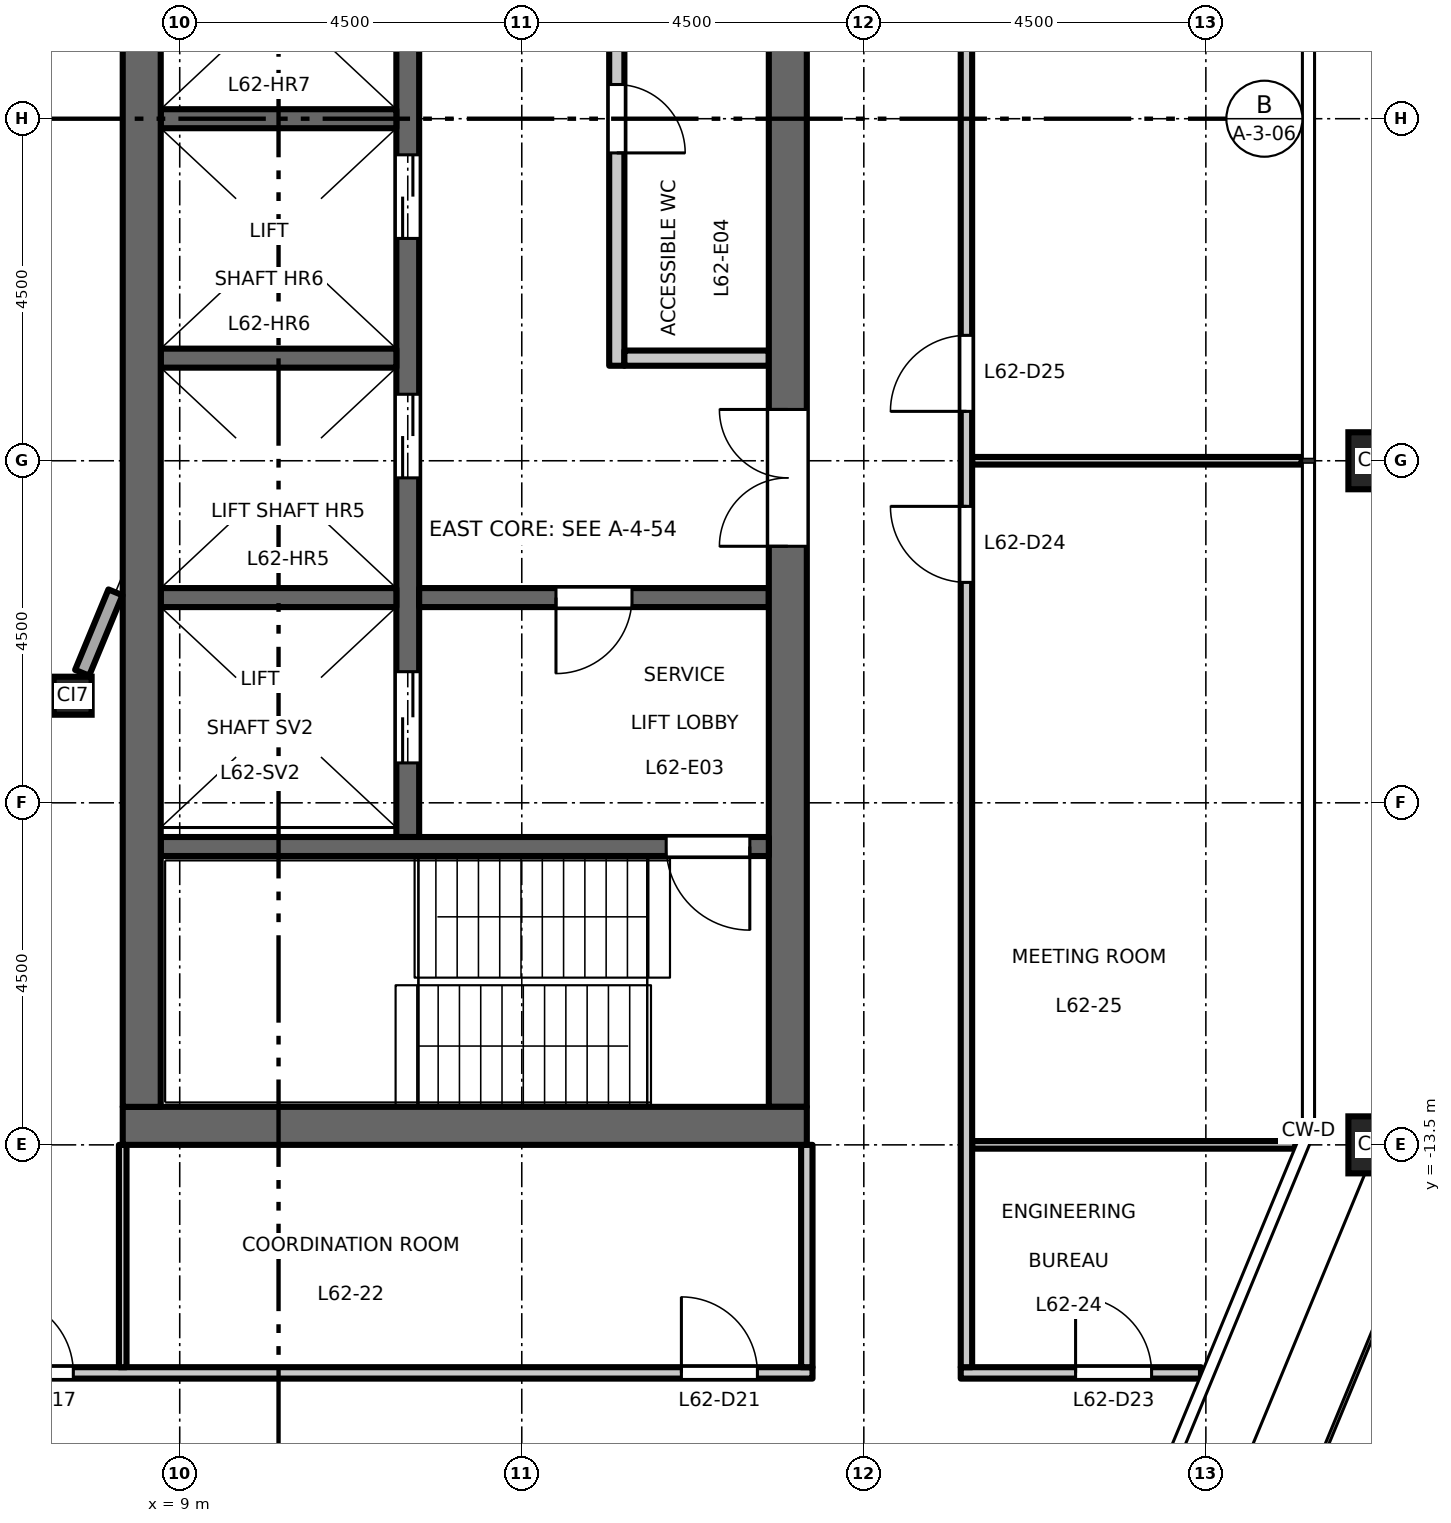
"""IFC4 building model, lengths in metres.
Left out: names, types, materials, properties, quantities, classifications, styles, units other than length and angle.
Written with IfcOpenShell. Run it as: python <this file> out.ifc"""

import sys

from ifc_helpers import new_model, si_unit, direction, frame, frame_2d, origin, origin_2d, place, context, subcontext, project, spatial, rectangle, hollow_rectangle, extrude, element, fill, save


model = new_model("IFC4")
c1 = context("Model", 3, precision=1e-05, world=origin(), true_north=direction((0.0, 1.0)))
c2 = subcontext(c1, "Body", "Model", "MODEL_VIEW")
j1 = project(units=[si_unit("LENGTHUNIT", "METRE"), si_unit("PLANEANGLEUNIT", "RADIAN")], contexts=[c1])
p1 = place(None, origin())
s1 = spatial("IfcSite", under=j1, at=p1, CompositionType="ELEMENT")
p2 = place(p1, origin())
s2 = spatial("IfcBuilding", under=s1, at=p2, CompositionType="ELEMENT")
p3 = place(p2, frame((0.0, 0.0, 289.7)))
s3 = spatial("IfcBuildingStorey", under=s2, at=p3, CompositionType="ELEMENT", Elevation=289.7)
for number, where, z_axis, x_axis in (
    (1, (24.75, -13.5, 0.0), (0.0, 0.0, 1.0), (1.0, 0.0, 0.0)),
    (2, (24.75, -4.5, 0.0), (0.0, 0.0, 1.0), (1.0, 0.0, 0.0)),
):
    element("IfcColumn", number, at=place(p3, frame(where, z_axis=z_axis, x_axis=x_axis)), inside=s3, PredefinedType="COLUMN", context=c2, shape_type="SweptSolid", body=[
        extrude(hollow_rectangle(XDim=0.75, YDim=0.75, WallThickness=0.04, at=origin_2d()), origin(), (0.0, 0.0, 1.0), 4.5),
    ])
p4 = place(p3, frame((7.591, -7.591, 0.0), z_axis=(0.0, 0.0, 1.0), x_axis=(1.0, 0.0, 0.0)))
e3 = element("IfcColumn", 3, at=p4, inside=s3, PredefinedType="COLUMN", context=c2, shape_type="SweptSolid", body=[
    extrude(hollow_rectangle(XDim=0.5, YDim=0.5, WallThickness=0.025, at=origin_2d()), origin(), (0.0, 0.0, 1.0), 4.5),
])
p5 = place(p3, frame((14.75, -3.25, 0.0), z_axis=(0.0, 0.0, 1.0), x_axis=(0.0, 1.0, 0.0)))
e4 = element("IfcWall", 4, at=p5, inside=s3, PredefinedType="PARTITIONING", context=c2, shape_type="SweptSolid", body=[
    extrude(rectangle(XDim=6.5, YDim=0.2, at=frame_2d((3.25, 0.0))), origin(), (0.0, 0.0, 1.0), 4.35),
])
p6 = place(p5, frame((2.8, 0.0, 0.0)))
e5 = element("IfcOpeningElement", 5, at=p6, cuts=e4, PredefinedType="OPENING", context=c2, shape_type="SweptSolid", body=[
    extrude(rectangle(XDim=0.9, YDim=2.1, at=frame_2d((0.45, 1.05))), frame((0.0, 0.11, 0.0), z_axis=(0.0, -1.0, 0.0), x_axis=(1.0, 0.0, 0.0)), (0.0, 0.0, 1.0), 0.22),
])
p7 = place(p3, frame((14.85, -3.15, 0.0), z_axis=(0.0, 0.0, 1.0), x_axis=(1.0, 0.0, 0.0)))
e6 = element("IfcWall", 6, at=p7, inside=s3, PredefinedType="PARTITIONING", context=c2, shape_type="SweptSolid", body=[
    extrude(rectangle(XDim=1.9, YDim=0.2, at=frame_2d((0.95, 0.0))), origin(), (0.0, 0.0, 1.0), 4.35),
])
p8 = place(p3, frame((12.0, -9.45, 0.0), z_axis=(0.0, 0.0, 1.0), x_axis=(0.0, 1.0, 0.0)))
e7 = element("IfcWall", 7, at=p8, inside=s3, PredefinedType="SHEAR", context=c2, shape_type="SweptSolid", body=[
    extrude(rectangle(XDim=18.9, YDim=0.3, at=frame_2d((9.45, 0.0))), origin(), (0.0, 0.0, 1.0), 4.35),
])
p9 = place(p8, frame((4.725, 0.0, 0.0)))
e8 = element("IfcOpeningElement", 8, at=p9, cuts=e7, PredefinedType="OPENING", context=c2, shape_type="SweptSolid", body=[
    extrude(rectangle(XDim=1.1, YDim=2.1, at=frame_2d((0.55, 1.05))), frame((0.0, 0.16, 0.0), z_axis=(0.0, -1.0, 0.0), x_axis=(1.0, 0.0, 0.0)), (0.0, 0.0, 1.0), 0.32),
])
p10 = place(p8, frame((7.875, 0.0, 0.0)))
e9 = element("IfcOpeningElement", 9, at=p10, cuts=e7, PredefinedType="OPENING", context=c2, shape_type="SweptSolid", body=[
    extrude(rectangle(XDim=1.1, YDim=2.1, at=frame_2d((0.55, 1.05))), frame((0.0, 0.16, 0.0), z_axis=(0.0, -1.0, 0.0), x_axis=(1.0, 0.0, 0.0)), (0.0, 0.0, 1.0), 0.32),
])
p11 = place(p8, frame((11.025, 0.0, 0.0)))
e10 = element("IfcOpeningElement", 10, at=p11, cuts=e7, PredefinedType="OPENING", context=c2, shape_type="SweptSolid", body=[
    extrude(rectangle(XDim=1.1, YDim=2.1, at=frame_2d((0.55, 1.05))), frame((0.0, 0.16, 0.0), z_axis=(0.0, -1.0, 0.0), x_axis=(1.0, 0.0, 0.0)), (0.0, 0.0, 1.0), 0.32),
])
p12 = place(p8, frame((14.175, 0.0, 0.0)))
e11 = element("IfcOpeningElement", 11, at=p12, cuts=e7, PredefinedType="OPENING", context=c2, shape_type="SweptSolid", body=[
    extrude(rectangle(XDim=1.1, YDim=2.1, at=frame_2d((0.55, 1.05))), frame((0.0, 0.16, 0.0), z_axis=(0.0, -1.0, 0.0), x_axis=(1.0, 0.0, 0.0)), (0.0, 0.0, 1.0), 0.32),
])
p13 = place(p8, frame((16.725, 0.0, 0.0)))
e12 = element("IfcOpeningElement", 12, at=p13, cuts=e7, PredefinedType="OPENING", context=c2, shape_type="SweptSolid", body=[
    extrude(rectangle(XDim=1.2, YDim=2.1, at=frame_2d((0.6, 1.05))), frame((0.0, 0.16, 0.0), z_axis=(0.0, -1.0, 0.0), x_axis=(1.0, 0.0, 0.0)), (0.0, 0.0, 1.0), 0.32),
])
p14 = place(p8, frame((0.975, 0.0, 0.0)))
e13 = element("IfcOpeningElement", 13, at=p14, cuts=e7, PredefinedType="OPENING", context=c2, shape_type="SweptSolid", body=[
    extrude(rectangle(XDim=1.2, YDim=2.1, at=frame_2d((0.6, 1.05))), frame((0.0, 0.16, 0.0), z_axis=(0.0, -1.0, 0.0), x_axis=(1.0, 0.0, 0.0)), (0.0, 0.0, 1.0), 0.32),
])
p15 = place(p3, frame((12.15, -6.3, 0.0), z_axis=(0.0, 0.0, 1.0), x_axis=(1.0, 0.0, 0.0)))
e14 = element("IfcWall", 14, at=p15, inside=s3, PredefinedType="SHEAR", context=c2, shape_type="SweptSolid", body=[
    extrude(rectangle(XDim=4.6, YDim=0.25, at=frame_2d((2.3, 0.0))), origin(), (0.0, 0.0, 1.0), 4.35),
])
p16 = place(p15, frame((1.8, 0.0, 0.0)))
e15 = element("IfcOpeningElement", 15, at=p16, cuts=e14, PredefinedType="OPENING", context=c2, shape_type="SweptSolid", body=[
    extrude(rectangle(XDim=1.0, YDim=2.1, at=frame_2d((0.5, 1.05))), frame((0.0, 0.135, 0.0), z_axis=(0.0, -1.0, 0.0), x_axis=(1.0, 0.0, 0.0)), (0.0, 0.0, 1.0), 0.27),
])
p17 = place(p3, frame((17.0, -13.0, 0.0), z_axis=(0.0, 0.0, 1.0), x_axis=(0.0, 1.0, 0.0)))
e16 = element("IfcWall", 16, at=p17, inside=s3, PredefinedType="SHEAR", context=c2, shape_type="SweptSolid", body=[
    extrude(rectangle(XDim=26.0, YDim=0.5, at=frame_2d((13.0, 0.0))), origin(), (0.0, 0.0, 1.0), 4.35),
])
p18 = place(p17, frame((16.825, 0.0, 0.0)))
e17 = element("IfcOpeningElement", 17, at=p18, cuts=e16, PredefinedType="OPENING", context=c2, shape_type="SweptSolid", body=[
    extrude(rectangle(XDim=1.8, YDim=2.1, at=frame_2d((0.9, 1.05))), frame((0.0, 0.26, 0.0), z_axis=(0.0, -1.0, 0.0), x_axis=(1.0, 0.0, 0.0)), (0.0, 0.0, 1.0), 0.52),
])
p19 = place(p17, frame((7.375, 0.0, 0.0)))
e18 = element("IfcOpeningElement", 18, at=p19, cuts=e16, PredefinedType="OPENING", context=c2, shape_type="SweptSolid", body=[
    extrude(rectangle(XDim=1.8, YDim=2.1, at=frame_2d((0.9, 1.05))), frame((0.0, 0.26, 0.0), z_axis=(0.0, -1.0, 0.0), x_axis=(1.0, 0.0, 0.0)), (0.0, 0.0, 1.0), 0.52),
])
for number, where, z_axis, x_axis in (
    (19, (8.75, 0.0, 0.0), (0.0, 0.0, 1.0), (1.0, 0.0, 0.0)),
    (20, (8.75, -3.15, 0.0), (0.0, 0.0, 1.0), (1.0, 0.0, 0.0)),
    (21, (8.75, -6.3, 0.0), (0.0, 0.0, 1.0), (1.0, 0.0, 0.0)),
):
    element("IfcWall", number, at=place(p3, frame(where, z_axis=z_axis, x_axis=x_axis)), inside=s3, PredefinedType="SHEAR", context=c2, shape_type="SweptSolid", body=[
        extrude(rectangle(XDim=3.1, YDim=0.25, at=frame_2d((1.55, 0.0))), origin(), (0.0, 0.0, 1.0), 4.35),
    ])
p20 = place(p3, frame((8.75, -9.575, 0.0), z_axis=(0.0, 0.0, 1.0), x_axis=(1.0, 0.0, 0.0)))
e22 = element("IfcWall", 22, at=p20, inside=s3, PredefinedType="SHEAR", context=c2, shape_type="SweptSolid", body=[
    extrude(rectangle(XDim=8.0, YDim=0.25, at=frame_2d((4.0, 0.0))), origin(), (0.0, 0.0, 1.0), 4.35),
])
p21 = place(p20, frame((6.65, 0.0, 0.0)))
e23 = element("IfcOpeningElement", 23, at=p21, cuts=e22, PredefinedType="OPENING", context=c2, shape_type="SweptSolid", body=[
    extrude(rectangle(XDim=1.1, YDim=2.1, at=frame_2d((0.55, 1.05))), frame((0.0, 0.135, 0.0), z_axis=(0.0, -1.0, 0.0), x_axis=(1.0, 0.0, 0.0)), (0.0, 0.0, 1.0), 0.27),
])
p22 = place(p3, frame((8.25, -13.25, 0.0), z_axis=(0.0, 0.0, 1.0), x_axis=(1.0, 0.0, 0.0)))
e24 = element("IfcWall", 24, at=p22, inside=s3, PredefinedType="SHEAR", context=c2, shape_type="SweptSolid", body=[
    extrude(rectangle(XDim=9.0, YDim=0.5, at=frame_2d((4.5, 0.0))), origin(), (0.0, 0.0, 1.0), 4.35),
])
p23 = place(p3, frame((8.5, -13.0, 0.0), z_axis=(0.0, 0.0, 1.0), x_axis=(0.0, 1.0, 0.0)))
e25 = element("IfcWall", 25, at=p23, inside=s3, PredefinedType="SHEAR", context=c2, shape_type="SweptSolid", body=[
    extrude(rectangle(XDim=26.0, YDim=0.5, at=frame_2d((13.0, 0.0))), origin(), (0.0, 0.0, 1.0), 4.35),
])
p24 = place(p3, frame((6.302, -8.125, 0.0), z_axis=(0.0, 0.0, 1.0), x_axis=(0.923919409248, 0.382587147216, 0.0)))
e26 = element("IfcWall", 26, at=p24, inside=s3, PredefinedType="STANDARD", context=c2, shape_type="SweptSolid", body=[
    extrude(rectangle(XDim=1.069, YDim=0.2, at=frame_2d((0.534, 0.0))), origin(), (0.0, 0.0, 1.0), 4.01),
])
p25 = place(p3, frame((7.716, -7.289, 0.0), z_axis=(0.0, 0.0, 1.0), x_axis=(0.382571404949, 0.923925927829, 0.0)))
e27 = element("IfcWall", 27, at=p25, inside=s3, PredefinedType="STANDARD", context=c2, shape_type="SweptSolid", body=[
    extrude(rectangle(XDim=1.146, YDim=0.2, at=frame_2d((0.573, 0.0))), origin(), (0.0, 0.0, 1.0), 4.01),
])
p26 = place(p3, frame((-17.325, -16.5, 0.0), z_axis=(0.0, 0.0, 1.0), x_axis=(1.0, 0.0, 0.0)))
e28 = element("IfcWall", 28, at=p26, inside=s3, PredefinedType="PARTITIONING", context=c2, shape_type="SweptSolid", body=[
    extrude(rectangle(XDim=34.65, YDim=0.15, at=frame_2d((17.325, 0.0))), origin(), (0.0, 0.0, 1.0), 4.35),
])
p27 = place(p26, frame((9.675, 0.0, 0.0)))
e29 = element("IfcOpeningElement", 29, at=p27, cuts=e28, PredefinedType="OPENING", context=c2, shape_type="SweptSolid", body=[
    extrude(rectangle(XDim=1.0, YDim=2.1, at=frame_2d((0.5, 1.05))), frame((0.0, 0.085, 0.0), z_axis=(0.0, -1.0, 0.0), x_axis=(1.0, 0.0, 0.0)), (0.0, 0.0, 1.0), 0.17),
])
p28 = place(p26, frame((23.925, 0.0, 0.0)))
e30 = element("IfcOpeningElement", 30, at=p28, cuts=e28, PredefinedType="OPENING", context=c2, shape_type="SweptSolid", body=[
    extrude(rectangle(XDim=1.0, YDim=2.1, at=frame_2d((0.5, 1.05))), frame((0.0, 0.085, 0.0), z_axis=(0.0, -1.0, 0.0), x_axis=(1.0, 0.0, 0.0)), (0.0, 0.0, 1.0), 0.17),
])
p29 = place(p26, frame((0.675, 0.0, 0.0)))
e31 = element("IfcOpeningElement", 31, at=p29, cuts=e28, PredefinedType="OPENING", context=c2, shape_type="SweptSolid", body=[
    extrude(rectangle(XDim=1.0, YDim=2.1, at=frame_2d((0.5, 1.05))), frame((0.0, 0.085, 0.0), z_axis=(0.0, -1.0, 0.0), x_axis=(1.0, 0.0, 0.0)), (0.0, 0.0, 1.0), 0.17),
])
p30 = place(p26, frame((32.925, 0.0, 0.0)))
e32 = element("IfcOpeningElement", 32, at=p30, cuts=e28, PredefinedType="OPENING", context=c2, shape_type="SweptSolid", body=[
    extrude(rectangle(XDim=1.0, YDim=2.1, at=frame_2d((0.5, 1.05))), frame((0.0, 0.085, 0.0), z_axis=(0.0, -1.0, 0.0), x_axis=(1.0, 0.0, 0.0)), (0.0, 0.0, 1.0), 0.17),
])
p31 = place(p3, frame((19.275, -16.5, 0.0), z_axis=(0.0, 0.0, 1.0), x_axis=(1.0, 0.0, 0.0)))
e33 = element("IfcWall", 33, at=p31, inside=s3, PredefinedType="PARTITIONING", context=c2, shape_type="SweptSolid", body=[
    extrude(rectangle(XDim=3.161, YDim=0.15, at=frame_2d((1.581, 0.0))), origin(), (0.0, 0.0, 1.0), 4.35),
])
p32 = place(p31, frame((1.511, 0.0, 0.0)))
e34 = element("IfcOpeningElement", 34, at=p32, cuts=e33, PredefinedType="OPENING", context=c2, shape_type="SweptSolid", body=[
    extrude(rectangle(XDim=1.0, YDim=2.1, at=frame_2d((0.5, 1.05))), frame((0.0, 0.085, 0.0), z_axis=(0.0, -1.0, 0.0), x_axis=(1.0, 0.0, 0.0)), (0.0, 0.0, 1.0), 0.17),
])
p33 = place(p3, frame((19.425, -13.5, 0.0), z_axis=(0.0, 0.0, 1.0), x_axis=(1.0, 0.0, 0.0)))
e35 = element("IfcWall", 35, at=p33, inside=s3, PredefinedType="PARTITIONING", context=c2, shape_type="SweptSolid", body=[
    extrude(rectangle(XDim=4.253, YDim=0.1, at=frame_2d((2.126, 0.0))), origin(), (0.0, 0.0, 1.0), 4.35),
])
p34 = place(p3, frame((19.425, -4.5, 0.0), z_axis=(0.0, 0.0, 1.0), x_axis=(1.0, 0.0, 0.0)))
e36 = element("IfcWall", 36, at=p34, inside=s3, PredefinedType="PARTITIONING", context=c2, shape_type="SweptSolid", body=[
    extrude(rectangle(XDim=4.335, YDim=0.1, at=frame_2d((2.167, 0.0))), origin(), (0.0, 0.0, 1.0), 4.35),
])
p35 = place(p3, frame((8.25, -16.425, 0.0), z_axis=(0.0, 0.0, 1.0), x_axis=(0.0, 1.0, 0.0)))
e37 = element("IfcWall", 37, at=p35, inside=s3, PredefinedType="PARTITIONING", context=c2, shape_type="SweptSolid", body=[
    extrude(rectangle(XDim=2.925, YDim=0.1, at=frame_2d((1.462, 0.0))), origin(), (0.0, 0.0, 1.0), 4.35),
])
p36 = place(p3, frame((17.25, -16.425, 0.0), z_axis=(0.0, 0.0, 1.0), x_axis=(0.0, 1.0, 0.0)))
e38 = element("IfcWall", 38, at=p36, inside=s3, PredefinedType="PARTITIONING", context=c2, shape_type="SweptSolid", body=[
    extrude(rectangle(XDim=2.925, YDim=0.15, at=frame_2d((1.462, 0.0))), origin(), (0.0, 0.0, 1.0), 4.35),
])
p37 = place(p3, frame((19.35, -16.425, 0.0), z_axis=(0.0, 0.0, 1.0), x_axis=(0.0, 1.0, 0.0)))
e39 = element("IfcWall", 39, at=p37, inside=s3, PredefinedType="PARTITIONING", context=c2, shape_type="SweptSolid", body=[
    extrude(rectangle(XDim=32.85, YDim=0.15, at=frame_2d((16.425, 0.0))), origin(), (0.0, 0.0, 1.0), 4.35),
])
p38 = place(p37, frame((10.325, 0.0, 0.0)))
e40 = element("IfcOpeningElement", 40, at=p38, cuts=e39, PredefinedType="OPENING", context=c2, shape_type="SweptSolid", body=[
    extrude(rectangle(XDim=1.0, YDim=2.1, at=frame_2d((0.5, 1.05))), frame((0.0, 0.085, 0.0), z_axis=(0.0, -1.0, 0.0), x_axis=(1.0, 0.0, 0.0)), (0.0, 0.0, 1.0), 0.17),
])
p39 = place(p37, frame((12.575, 0.0, 0.0)))
e41 = element("IfcOpeningElement", 41, at=p39, cuts=e39, PredefinedType="OPENING", context=c2, shape_type="SweptSolid", body=[
    extrude(rectangle(XDim=1.0, YDim=2.1, at=frame_2d((0.5, 1.05))), frame((0.0, 0.085, 0.0), z_axis=(0.0, -1.0, 0.0), x_axis=(1.0, 0.0, 0.0)), (0.0, 0.0, 1.0), 0.17),
])
p40 = place(p37, frame((28.325, 0.0, 0.0)))
e42 = element("IfcOpeningElement", 42, at=p40, cuts=e39, PredefinedType="OPENING", context=c2, shape_type="SweptSolid", body=[
    extrude(rectangle(XDim=1.0, YDim=2.1, at=frame_2d((0.5, 1.05))), frame((0.0, 0.085, 0.0), z_axis=(0.0, -1.0, 0.0), x_axis=(1.0, 0.0, 0.0)), (0.0, 0.0, 1.0), 0.17),
])
p41 = place(p16, origin())
e43 = element("IfcDoor", 43, at=p41, inside=s3, OperationType="SINGLE_SWING_LEFT", PredefinedType="DOOR", context=c2, shape_type="SweptSolid", body=[
    extrude(rectangle(XDim=1.0, YDim=2.1, at=frame_2d((0.5, 1.05))), frame((0.0, 0.025, 0.0), z_axis=(0.0, -1.0, 0.0), x_axis=(1.0, 0.0, 0.0)), (0.0, 0.0, 1.0), 0.05),
])
fill(e15, e43)
p42 = place(p21, origin())
e44 = element("IfcDoor", 44, at=p42, inside=s3, OperationType="SINGLE_SWING_RIGHT", PredefinedType="DOOR", context=c2, shape_type="SweptSolid", body=[
    extrude(rectangle(XDim=1.1, YDim=2.1, at=frame_2d((0.55, 1.05))), frame((0.0, 0.025, 0.0), z_axis=(0.0, -1.0, 0.0), x_axis=(1.0, 0.0, 0.0)), (0.0, 0.0, 1.0), 0.05),
])
fill(e23, e44)
p43 = place(p19, origin())
e45 = element("IfcDoor", 45, at=p43, inside=s3, OperationType="DOUBLE_DOOR_DOUBLE_SWING", PredefinedType="DOOR", context=c2, shape_type="SweptSolid", body=[
    extrude(rectangle(XDim=1.8, YDim=2.1, at=frame_2d((0.9, 1.05))), frame((0.0, 0.025, 0.0), z_axis=(0.0, -1.0, 0.0), x_axis=(1.0, 0.0, 0.0)), (0.0, 0.0, 1.0), 0.05),
])
fill(e18, e45)
p44 = place(p9, origin())
e46 = element("IfcDoor", 46, at=p44, inside=s3, OperationType="DOUBLE_DOOR_SLIDING", PredefinedType="DOOR", context=c2, shape_type="SweptSolid", body=[
    extrude(rectangle(XDim=1.1, YDim=2.1, at=frame_2d((0.55, 1.05))), frame((0.0, 0.025, 0.0), z_axis=(0.0, -1.0, 0.0), x_axis=(1.0, 0.0, 0.0)), (0.0, 0.0, 1.0), 0.05),
])
fill(e8, e46)
p45 = place(p10, origin())
e47 = element("IfcDoor", 47, at=p45, inside=s3, OperationType="DOUBLE_DOOR_SLIDING", PredefinedType="DOOR", context=c2, shape_type="SweptSolid", body=[
    extrude(rectangle(XDim=1.1, YDim=2.1, at=frame_2d((0.55, 1.05))), frame((0.0, 0.025, 0.0), z_axis=(0.0, -1.0, 0.0), x_axis=(1.0, 0.0, 0.0)), (0.0, 0.0, 1.0), 0.05),
])
fill(e9, e47)
p46 = place(p14, origin())
e48 = element("IfcDoor", 48, at=p46, inside=s3, OperationType="DOUBLE_DOOR_SLIDING", PredefinedType="DOOR", context=c2, shape_type="SweptSolid", body=[
    extrude(rectangle(XDim=1.2, YDim=2.1, at=frame_2d((0.6, 1.05))), frame((0.0, 0.025, 0.0), z_axis=(0.0, -1.0, 0.0), x_axis=(1.0, 0.0, 0.0)), (0.0, 0.0, 1.0), 0.05),
])
fill(e13, e48)
p47 = place(p6, origin())
e49 = element("IfcDoor", 49, at=p47, inside=s3, OperationType="SINGLE_SWING_LEFT", PredefinedType="DOOR", context=c2, shape_type="SweptSolid", body=[
    extrude(rectangle(XDim=0.9, YDim=2.1, at=frame_2d((0.45, 1.05))), frame((0.0, 0.025, 0.0), z_axis=(0.0, -1.0, 0.0), x_axis=(1.0, 0.0, 0.0)), (0.0, 0.0, 1.0), 0.05),
])
fill(e5, e49)
p48 = place(p28, origin())
e50 = element("IfcDoor", 50, at=p48, inside=s3, OperationType="SINGLE_SWING_LEFT", PredefinedType="DOOR", context=c2, shape_type="SweptSolid", body=[
    extrude(rectangle(XDim=1.0, YDim=2.1, at=frame_2d((0.5, 1.05))), frame((0.0, 0.025, 0.0), z_axis=(0.0, -1.0, 0.0), x_axis=(1.0, 0.0, 0.0)), (0.0, 0.0, 1.0), 0.05),
])
fill(e30, e50)
p49 = place(p30, origin())
e51 = element("IfcDoor", 51, at=p49, inside=s3, OperationType="SINGLE_SWING_LEFT", PredefinedType="DOOR", context=c2, shape_type="SweptSolid", body=[
    extrude(rectangle(XDim=1.0, YDim=2.1, at=frame_2d((0.5, 1.05))), frame((0.0, 0.025, 0.0), z_axis=(0.0, -1.0, 0.0), x_axis=(1.0, 0.0, 0.0)), (0.0, 0.0, 1.0), 0.05),
])
fill(e32, e51)
p50 = place(p32, origin())
e52 = element("IfcDoor", 52, at=p50, inside=s3, OperationType="SINGLE_SWING_LEFT", PredefinedType="DOOR", context=c2, shape_type="SweptSolid", body=[
    extrude(rectangle(XDim=1.0, YDim=2.1, at=frame_2d((0.5, 1.05))), frame((0.0, 0.025, 0.0), z_axis=(0.0, -1.0, 0.0), x_axis=(1.0, 0.0, 0.0)), (0.0, 0.0, 1.0), 0.05),
])
fill(e34, e52)
p51 = place(p38, origin())
e53 = element("IfcDoor", 53, at=p51, inside=s3, OperationType="SINGLE_SWING_RIGHT", PredefinedType="DOOR", context=c2, shape_type="SweptSolid", body=[
    extrude(rectangle(XDim=1.0, YDim=2.1, at=frame_2d((0.5, 1.05))), frame((0.0, 0.025, 0.0), z_axis=(0.0, -1.0, 0.0), x_axis=(1.0, 0.0, 0.0)), (0.0, 0.0, 1.0), 0.05),
])
fill(e40, e53)
p52 = place(p39, origin())
e54 = element("IfcDoor", 54, at=p52, inside=s3, OperationType="SINGLE_SWING_LEFT", PredefinedType="DOOR", context=c2, shape_type="SweptSolid", body=[
    extrude(rectangle(XDim=1.0, YDim=2.1, at=frame_2d((0.5, 1.05))), frame((0.0, 0.025, 0.0), z_axis=(0.0, -1.0, 0.0), x_axis=(1.0, 0.0, 0.0)), (0.0, 0.0, 1.0), 0.05),
])
fill(e41, e54)
save(model, sys.argv[1])
